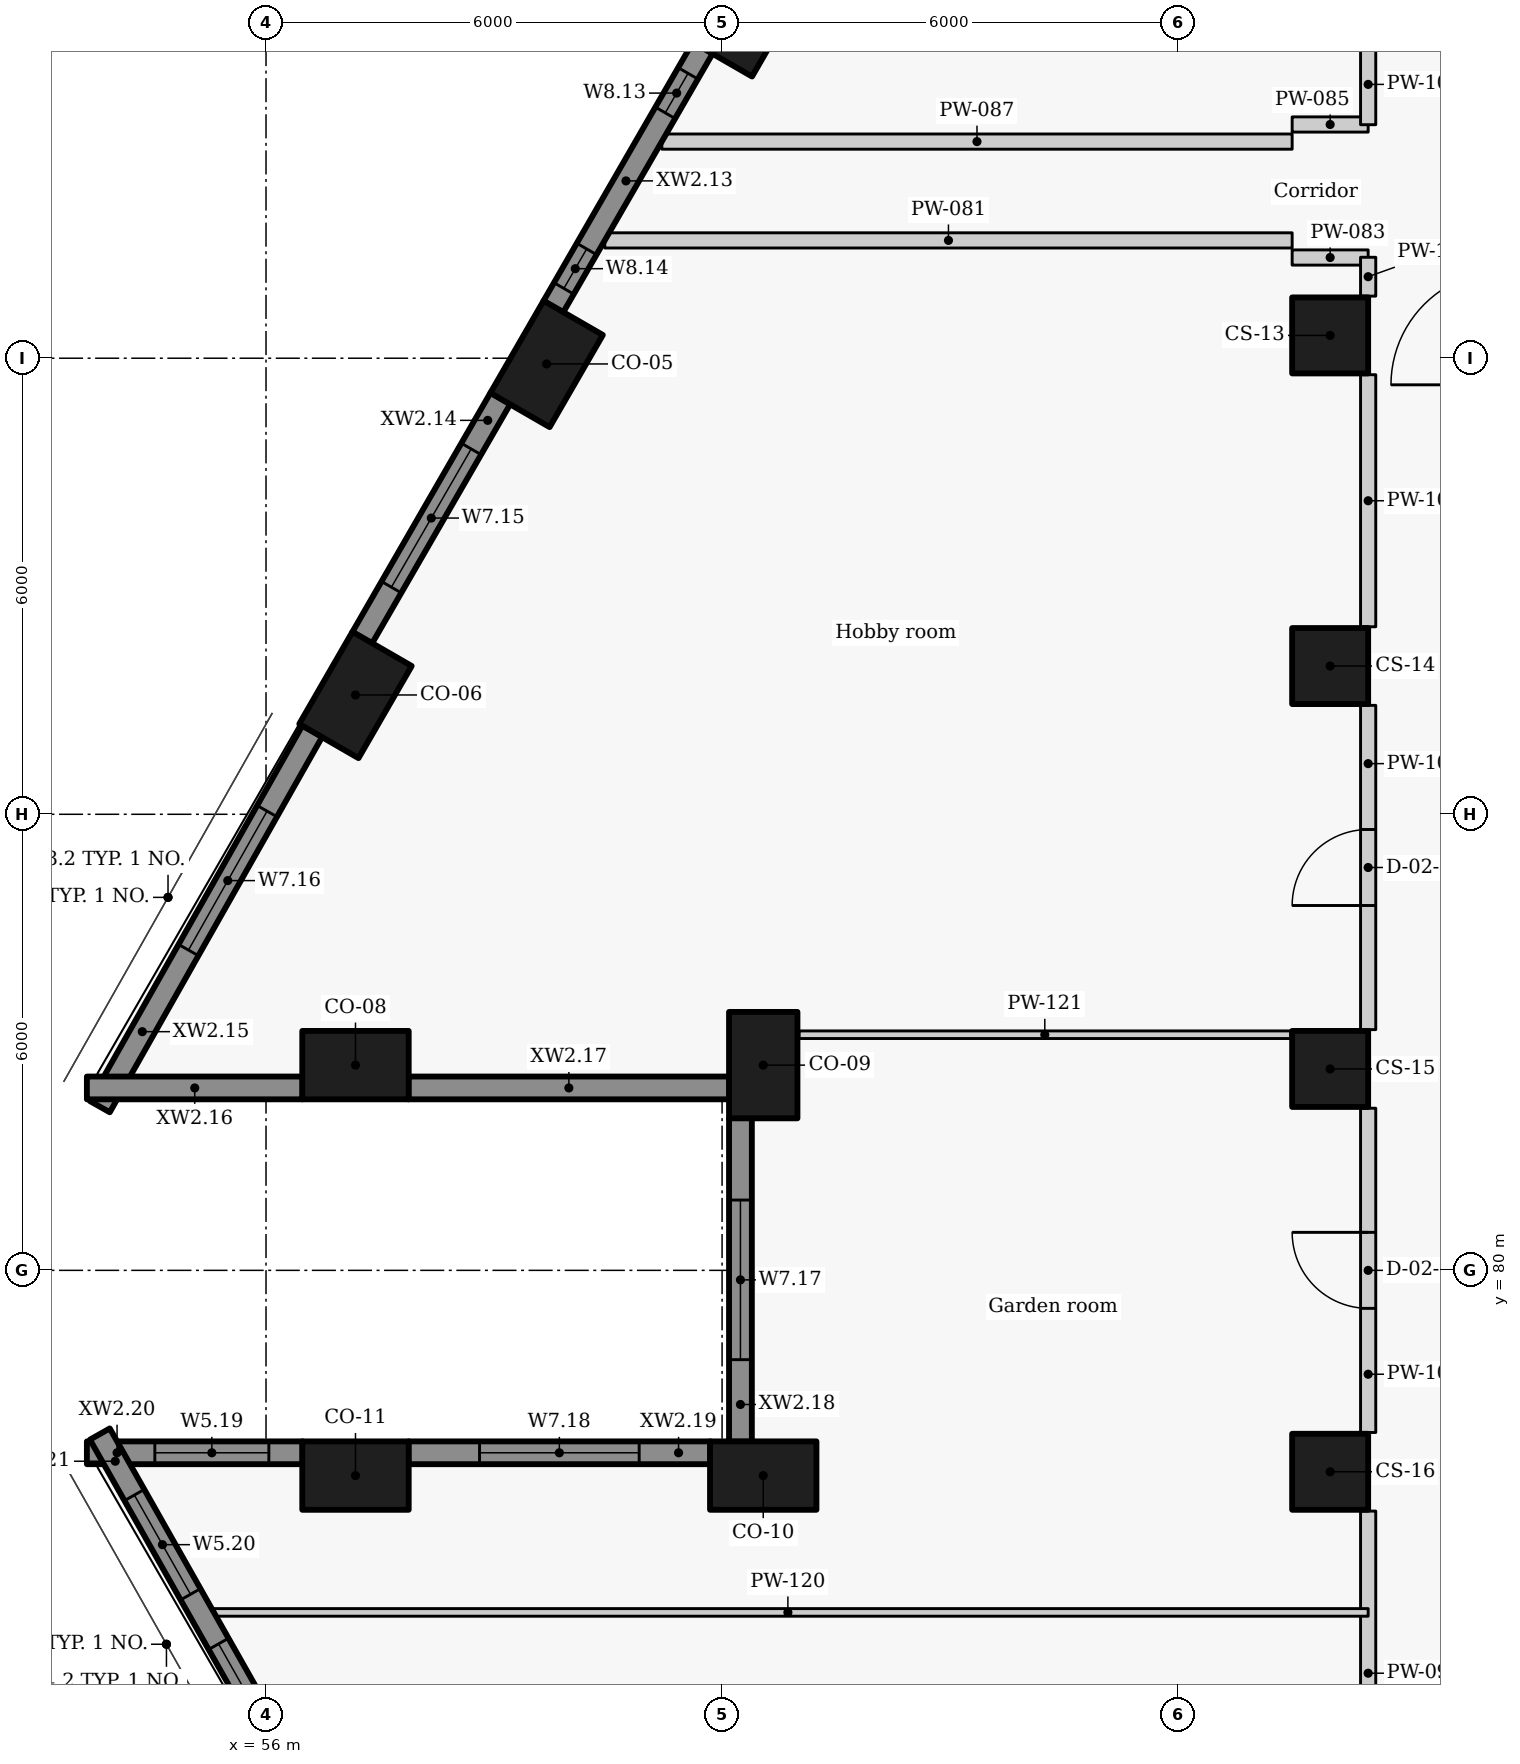
"""IFC4 building model, lengths in metres.
Left out: names, types, materials, properties, quantities, classifications, styles, units other than length and angle.
Written with IfcOpenShell. Run it as: python <this file> out.ifc"""

import sys

from ifc_helpers import new_model, si_unit, direction, frame, frame_2d, origin, origin_2d, place, context, subcontext, project, spatial, rectangle, extrude, element, fill, save


model = new_model("IFC4")
c1 = context("Model", 3, precision=1e-05, world=origin(), true_north=direction((0.0, 1.0)))
c2 = subcontext(c1, "Body", "Model", "MODEL_VIEW")
j1 = project(units=[si_unit("LENGTHUNIT", "METRE"), si_unit("PLANEANGLEUNIT", "RADIAN")], contexts=[c1])
p1 = place(None, origin())
s1 = spatial("IfcSite", under=j1, at=p1, CompositionType="ELEMENT")
p2 = place(p1, origin())
s2 = spatial("IfcBuilding", under=s1, at=p2, CompositionType="ELEMENT")
p3 = place(p2, frame((0.0, 0.0, 77.7)))
s3 = spatial("IfcBuildingStorey", under=s2, at=p3, CompositionType="ELEMENT", Elevation=77.7)
for number, where, z_axis, x_axis in (
    (1, (62.354, 96.537, 0.0), (0.0, 0.0, 1.0), (-0.5, -0.866, 0.0)),
    (2, (59.692, 91.925, 0.0), (0.0, 0.0, 1.0), (-0.5, -0.866, 0.0)),
    (3, (57.177, 87.57, 0.0), (0.0, 0.0, 1.0), (-0.5, -0.866, 0.0)),
    (4, (57.177, 82.7, 0.0), (0.0, 0.0, 1.0), (1.0, 0.0, 0.0)),
    (5, (62.542, 82.7, 0.0), (0.0, 0.0, 1.0), (0.0, -1.0, 0.0)),
    (6, (62.542, 77.3, 0.0), (0.0, 0.0, 1.0), (-1.0, 0.0, 0.0)),
    (7, (57.177, 77.3, 0.0), (0.0, 0.0, 1.0), (-1.0, 0.0, 0.0)),
):
    element("IfcColumn", number, at=place(p3, frame(where, z_axis=z_axis, x_axis=x_axis)), inside=s3, PredefinedType="COLUMN", context=c2, shape_type="SweptSolid", body=[
        extrude(rectangle(XDim=1.4, YDim=0.9, at=origin_2d()), origin(), (0.0, 0.0, 1.0), 3.3),
    ])
for number, where, z_axis, x_axis in (
    (8, (70.0, 92.3, 0.0), (0.0, 0.0, 1.0), (0.0, -1.0, 0.0)),
    (9, (70.0, 87.95, 0.0), (0.0, 0.0, 1.0), (0.0, -1.0, 0.0)),
    (10, (70.0, 82.65, 0.0), (0.0, 0.0, 1.0), (0.0, -1.0, 0.0)),
    (11, (70.0, 77.35, 0.0), (0.0, 0.0, 1.0), (0.0, -1.0, 0.0)),
):
    element("IfcColumn", number, at=place(p3, frame(where, z_axis=z_axis, x_axis=x_axis)), inside=s3, PredefinedType="COLUMN", context=c2, shape_type="SweptSolid", body=[
        extrude(rectangle(XDim=1.0, YDim=1.0, at=origin_2d()), origin(), (0.0, 0.0, 1.0), 3.3),
    ])
p4 = place(p3, frame((61.747, 96.084, 0.0), z_axis=(0.0, 0.0, 1.0), x_axis=(-0.499957037901, -0.866050206543, 0.0)))
e12 = element("IfcWall", 12, at=p4, inside=s3, PredefinedType="SOLIDWALL", context=c2, shape_type="SweptSolid", body=[
    extrude(rectangle(XDim=3.934, YDim=0.3, at=frame_2d((1.967, 0.0))), origin(), (0.0, 0.0, 1.0), 2.425),
])
p5 = place(p4, frame((0.389, 0.0, 0.9)))
e13 = element("IfcOpeningElement", 13, at=p5, cuts=e12, PredefinedType="OPENING", context=c2, shape_type="SweptSolid", body=[
    extrude(rectangle(XDim=0.6, YDim=1.1, at=frame_2d((0.3, 0.55))), frame((0.0, 0.16, 0.0), z_axis=(0.0, -1.0, 0.0), x_axis=(1.0, 0.0, 0.0)), (0.0, 0.0, 1.0), 0.32),
])
p6 = place(p4, frame((3.056, 0.0, 0.9)))
e14 = element("IfcOpeningElement", 14, at=p6, cuts=e12, PredefinedType="OPENING", context=c2, shape_type="SweptSolid", body=[
    extrude(rectangle(XDim=0.6, YDim=1.1, at=frame_2d((0.3, 0.55))), frame((0.0, 0.16, 0.0), z_axis=(0.0, -1.0, 0.0), x_axis=(1.0, 0.0, 0.0)), (0.0, 0.0, 1.0), 0.32),
])
p7 = place(p3, frame((59.084, 91.472, 0.0), z_axis=(0.0, 0.0, 1.0), x_axis=(-0.500009139881, -0.866020126807, 0.0)))
e15 = element("IfcWall", 15, at=p7, inside=s3, PredefinedType="SOLIDWALL", context=c2, shape_type="SweptSolid", body=[
    extrude(rectangle(XDim=3.637, YDim=0.3, at=frame_2d((1.818, 0.0))), origin(), (0.0, 0.0, 1.0), 2.425),
])
p8 = place(p7, frame((0.768, 0.0, 0.9)))
e16 = element("IfcOpeningElement", 16, at=p8, cuts=e15, PredefinedType="OPENING", context=c2, shape_type="SweptSolid", body=[
    extrude(rectangle(XDim=2.1, YDim=1.1, at=frame_2d((1.05, 0.55))), frame((0.0, 0.16, 0.0), z_axis=(0.0, -1.0, 0.0), x_axis=(1.0, 0.0, 0.0)), (0.0, 0.0, 1.0), 0.32),
])
p9 = place(p3, frame((56.609, 87.094, 0.0), z_axis=(0.0, 0.0, 1.0), x_axis=(-0.492456858874, -0.870336855561, 0.0)))
e17 = element("IfcWall", 17, at=p9, inside=s3, PredefinedType="SOLIDWALL", context=c2, shape_type="SweptSolid", body=[
    extrude(rectangle(XDim=5.677, YDim=0.3, at=frame_2d((2.838, 0.0))), origin(), (0.0, 0.0, 1.0), 2.425),
])
p10 = place(p9, frame((1.209, 0.0, 0.9)))
e18 = element("IfcOpeningElement", 18, at=p10, cuts=e17, PredefinedType="OPENING", context=c2, shape_type="SweptSolid", body=[
    extrude(rectangle(XDim=2.1, YDim=1.1, at=frame_2d((1.05, 0.55))), frame((0.0, 0.16, 0.0), z_axis=(0.0, -1.0, 0.0), x_axis=(1.0, 0.0, 0.0)), (0.0, 0.0, 1.0), 0.32),
])
p11 = place(p3, frame((53.643, 82.4, 0.0), z_axis=(0.0, 0.0, 1.0), x_axis=(1.0, 0.0, 0.0)))
e19 = element("IfcWall", 19, at=p11, inside=s3, PredefinedType="SOLIDWALL", context=c2, shape_type="SweptSolid", body=[
    extrude(rectangle(XDim=2.838, YDim=0.3, at=frame_2d((1.419, 0.0))), origin(), (0.0, 0.0, 1.0), 2.425),
])
p12 = place(p3, frame((57.873, 82.4, 0.0), z_axis=(0.0, 0.0, 1.0), x_axis=(1.0, 0.0, 0.0)))
e20 = element("IfcWall", 20, at=p12, inside=s3, PredefinedType="SOLIDWALL", context=c2, shape_type="SweptSolid", body=[
    extrude(rectangle(XDim=4.223, YDim=0.3, at=frame_2d((2.111, 0.0))), origin(), (0.0, 0.0, 1.0), 2.425),
])
p13 = place(p3, frame((62.242, 82.004, 0.0), z_axis=(0.0, 0.0, 1.0), x_axis=(0.0, -1.0, 0.0)))
e21 = element("IfcWall", 21, at=p13, inside=s3, PredefinedType="SOLIDWALL", context=c2, shape_type="SweptSolid", body=[
    extrude(rectangle(XDim=4.258, YDim=0.3, at=frame_2d((2.129, 0.0))), origin(), (0.0, 0.0, 1.0), 2.425),
])
p14 = place(p13, frame((1.079, 0.0, 0.9)))
e22 = element("IfcOpeningElement", 22, at=p14, cuts=e21, PredefinedType="OPENING", context=c2, shape_type="SweptSolid", body=[
    extrude(rectangle(XDim=2.1, YDim=1.1, at=frame_2d((1.05, 0.55))), frame((0.0, 0.16, 0.0), z_axis=(0.0, -1.0, 0.0), x_axis=(1.0, 0.0, 0.0)), (0.0, 0.0, 1.0), 0.32),
])
p15 = place(p3, frame((61.846, 77.6, 0.0), z_axis=(0.0, 0.0, 1.0), x_axis=(-1.0, 0.0, 0.0)))
e23 = element("IfcWall", 23, at=p15, inside=s3, PredefinedType="SOLIDWALL", context=c2, shape_type="SweptSolid", body=[
    extrude(rectangle(XDim=3.973, YDim=0.3, at=frame_2d((1.986, 0.0))), origin(), (0.0, 0.0, 1.0), 2.425),
])
p16 = place(p15, frame((0.936, 0.0, 0.9)))
e24 = element("IfcOpeningElement", 24, at=p16, cuts=e23, PredefinedType="OPENING", context=c2, shape_type="SweptSolid", body=[
    extrude(rectangle(XDim=2.1, YDim=1.1, at=frame_2d((1.05, 0.55))), frame((0.0, 0.16, 0.0), z_axis=(0.0, -1.0, 0.0), x_axis=(1.0, 0.0, 0.0)), (0.0, 0.0, 1.0), 0.32),
])
p17 = place(p3, frame((56.481, 77.6, 0.0), z_axis=(0.0, 0.0, 1.0), x_axis=(-1.0, 0.0, 0.0)))
e25 = element("IfcWall", 25, at=p17, inside=s3, PredefinedType="SOLIDWALL", context=c2, shape_type="SweptSolid", body=[
    extrude(rectangle(XDim=2.838, YDim=0.3, at=frame_2d((1.419, 0.0))), origin(), (0.0, 0.0, 1.0), 2.425),
])
p18 = place(p17, frame((0.444, 0.0, 0.9)))
e26 = element("IfcOpeningElement", 26, at=p18, cuts=e25, PredefinedType="OPENING", context=c2, shape_type="SweptSolid", body=[
    extrude(rectangle(XDim=1.5, YDim=1.1, at=frame_2d((0.75, 0.55))), frame((0.0, 0.16, 0.0), z_axis=(0.0, -1.0, 0.0), x_axis=(1.0, 0.0, 0.0)), (0.0, 0.0, 1.0), 0.32),
])
p19 = place(p3, frame((53.814, 77.847, 0.0), z_axis=(0.0, 0.0, 1.0), x_axis=(0.492456858874, -0.870336855561, 0.0)))
e27 = element("IfcWall", 27, at=p19, inside=s3, PredefinedType="SOLIDWALL", context=c2, shape_type="SweptSolid", body=[
    extrude(rectangle(XDim=5.677, YDim=0.3, at=frame_2d((2.838, 0.0))), origin(), (0.0, 0.0, 1.0), 2.425),
])
p20 = place(p19, frame((0.922, 0.0, 0.9)))
e28 = element("IfcOpeningElement", 28, at=p20, cuts=e27, PredefinedType="OPENING", context=c2, shape_type="SweptSolid", body=[
    extrude(rectangle(XDim=1.5, YDim=1.1, at=frame_2d((0.75, 0.55))), frame((0.0, 0.16, 0.0), z_axis=(0.0, -1.0, 0.0), x_axis=(1.0, 0.0, 0.0)), (0.0, 0.0, 1.0), 0.32),
])
p21 = place(p19, frame((3.172, 0.0, 0.9)))
e29 = element("IfcOpeningElement", 29, at=p21, cuts=e27, PredefinedType="OPENING", context=c2, shape_type="SweptSolid", body=[
    extrude(rectangle(XDim=2.1, YDim=1.1, at=frame_2d((1.05, 0.55))), frame((0.0, 0.16, 0.0), z_axis=(0.0, -1.0, 0.0), x_axis=(1.0, 0.0, 0.0)), (0.0, 0.0, 1.0), 0.32),
])
p22 = place(p3, frame((60.457, 93.55, 0.0), z_axis=(0.0, 0.0, 1.0), x_axis=(1.0, 0.0, 0.0)))
e30 = element("IfcWall", 30, at=p22, inside=s3, PredefinedType="PARTITIONING", context=c2, shape_type="SweptSolid", body=[
    extrude(rectangle(XDim=9.043, YDim=0.2, at=frame_2d((4.521, 0.0))), origin(), (0.0, 0.0, 1.0), 2.405),
])
for number, where, z_axis, x_axis in (
    (31, (69.5, 93.325, 0.0), (0.0, 0.0, 1.0), (1.0, 0.0, 0.0)),
    (32, (69.5, 95.075, 0.0), (0.0, 0.0, 1.0), (1.0, 0.0, 0.0)),
):
    element("IfcWall", number, at=place(p3, frame(where, z_axis=z_axis, x_axis=x_axis)), inside=s3, PredefinedType="PARTITIONING", context=c2, shape_type="SweptSolid", body=[
        extrude(rectangle(XDim=1.0, YDim=0.2, at=frame_2d((0.5, 0.0))), origin(), (0.0, 0.0, 1.0), 2.505),
    ])
p23 = place(p3, frame((61.207, 94.85, 0.0), z_axis=(0.0, 0.0, 1.0), x_axis=(1.0, 0.0, 0.0)))
e33 = element("IfcWall", 33, at=p23, inside=s3, PredefinedType="PARTITIONING", context=c2, shape_type="SweptSolid", body=[
    extrude(rectangle(XDim=8.293, YDim=0.2, at=frame_2d((4.146, 0.0))), origin(), (0.0, 0.0, 1.0), 2.405),
])
p24 = place(p3, frame((70.5, 72.567, 0.0), z_axis=(0.0, 0.0, 1.0), x_axis=(0.0, 1.0, 0.0)))
e34 = element("IfcWall", 34, at=p24, inside=s3, PredefinedType="PARTITIONING", context=c2, shape_type="SweptSolid", body=[
    extrude(rectangle(XDim=4.266, YDim=0.2, at=frame_2d((2.133, 0.0))), origin(), (0.0, 0.0, 1.0), 3.025),
])
p25 = place(p3, frame((70.5, 77.867, 0.0), z_axis=(0.0, 0.0, 1.0), x_axis=(0.0, 1.0, 0.0)))
e35 = element("IfcWall", 35, at=p25, inside=s3, PredefinedType="PARTITIONING", context=c2, shape_type="SweptSolid", body=[
    extrude(rectangle(XDim=4.266, YDim=0.2, at=frame_2d((2.133, 0.0))), origin(), (0.0, 0.0, 1.0), 3.025),
])
p26 = place(p25, frame((1.633, 0.0, 0.0)))
e36 = element("IfcOpeningElement", 36, at=p26, cuts=e35, PredefinedType="OPENING", context=c2, shape_type="SweptSolid", body=[
    extrude(rectangle(XDim=1.0, YDim=2.1, at=frame_2d((0.5, 1.05))), frame((0.0, 0.11, 0.0), z_axis=(0.0, -1.0, 0.0), x_axis=(1.0, 0.0, 0.0)), (0.0, 0.0, 1.0), 0.22),
])
p27 = place(p3, frame((70.5, 83.167, 0.0), z_axis=(0.0, 0.0, 1.0), x_axis=(0.0, 1.0, 0.0)))
e37 = element("IfcWall", 37, at=p27, inside=s3, PredefinedType="PARTITIONING", context=c2, shape_type="SweptSolid", body=[
    extrude(rectangle(XDim=4.266, YDim=0.2, at=frame_2d((2.133, 0.0))), origin(), (0.0, 0.0, 1.0), 3.025),
])
p28 = place(p27, frame((1.633, 0.0, 0.0)))
e38 = element("IfcOpeningElement", 38, at=p28, cuts=e37, PredefinedType="OPENING", context=c2, shape_type="SweptSolid", body=[
    extrude(rectangle(XDim=1.0, YDim=2.1, at=frame_2d((0.5, 1.05))), frame((0.0, 0.11, 0.0), z_axis=(0.0, -1.0, 0.0), x_axis=(1.0, 0.0, 0.0)), (0.0, 0.0, 1.0), 0.22),
])
p29 = place(p3, frame((70.5, 88.467, 0.0), z_axis=(0.0, 0.0, 1.0), x_axis=(0.0, 1.0, 0.0)))
e39 = element("IfcWall", 39, at=p29, inside=s3, PredefinedType="PARTITIONING", context=c2, shape_type="SweptSolid", body=[
    extrude(rectangle(XDim=3.316, YDim=0.2, at=frame_2d((1.658, 0.0))), origin(), (0.0, 0.0, 1.0), 3.025),
])
p30 = place(p3, frame((70.5, 92.817, 0.0), z_axis=(0.0, 0.0, 1.0), x_axis=(0.0, 1.0, 0.0)))
e40 = element("IfcWall", 40, at=p30, inside=s3, PredefinedType="PARTITIONING", context=c2, shape_type="SweptSolid", body=[
    extrude(rectangle(XDim=0.511, YDim=0.2, at=frame_2d((0.255, 0.0))), origin(), (0.0, 0.0, 1.0), 3.025),
])
p31 = place(p3, frame((70.5, 95.072, 0.0), z_axis=(0.0, 0.0, 1.0), x_axis=(0.0, 1.0, 0.0)))
e41 = element("IfcWall", 41, at=p31, inside=s3, PredefinedType="PARTITIONING", context=c2, shape_type="SweptSolid", body=[
    extrude(rectangle(XDim=1.061, YDim=0.2, at=frame_2d((0.531, 0.0))), origin(), (0.0, 0.0, 1.0), 3.025),
])
p32 = place(p3, frame((55.232, 75.5, 0.0), z_axis=(0.0, 0.0, 1.0), x_axis=(1.0, 0.0, 0.0)))
e42 = element("IfcWall", 42, at=p32, inside=s3, PredefinedType="PARTITIONING", context=c2, shape_type="SweptSolid", body=[
    extrude(rectangle(XDim=15.268, YDim=0.1, at=frame_2d((7.634, 0.0))), origin(), (0.0, 0.0, 1.0), 2.405),
])
p33 = place(p3, frame((63.012, 83.1, 0.0), z_axis=(0.0, 0.0, 1.0), x_axis=(1.0, 0.0, 0.0)))
e43 = element("IfcWall", 43, at=p33, inside=s3, PredefinedType="PARTITIONING", context=c2, shape_type="SweptSolid", body=[
    extrude(rectangle(XDim=6.468, YDim=0.1, at=frame_2d((3.234, 0.0))), origin(), (0.0, 0.0, 1.0), 3.025),
])
p34 = place(p5, origin())
e44 = element("IfcWindow", 44, at=p34, inside=s3, PartitioningType="SINGLE_PANEL", PredefinedType="WINDOW", context=c2, shape_type="SweptSolid", body=[
    extrude(rectangle(XDim=0.6, YDim=1.1, at=frame_2d((0.3, 0.55))), frame((0.0, 0.03, 0.0), z_axis=(0.0, -1.0, 0.0), x_axis=(1.0, 0.0, 0.0)), (0.0, 0.0, 1.0), 0.06),
])
fill(e13, e44)
p35 = place(p6, origin())
e45 = element("IfcWindow", 45, at=p35, inside=s3, PartitioningType="SINGLE_PANEL", PredefinedType="WINDOW", context=c2, shape_type="SweptSolid", body=[
    extrude(rectangle(XDim=0.6, YDim=1.1, at=frame_2d((0.3, 0.55))), frame((0.0, 0.03, 0.0), z_axis=(0.0, -1.0, 0.0), x_axis=(1.0, 0.0, 0.0)), (0.0, 0.0, 1.0), 0.06),
])
fill(e14, e45)
p36 = place(p8, origin())
e46 = element("IfcWindow", 46, at=p36, inside=s3, PartitioningType="SINGLE_PANEL", PredefinedType="WINDOW", context=c2, shape_type="SweptSolid", body=[
    extrude(rectangle(XDim=2.1, YDim=1.1, at=frame_2d((1.05, 0.55))), frame((0.0, 0.03, 0.0), z_axis=(0.0, -1.0, 0.0), x_axis=(1.0, 0.0, 0.0)), (0.0, 0.0, 1.0), 0.06),
])
fill(e16, e46)
p37 = place(p10, origin())
e47 = element("IfcWindow", 47, at=p37, inside=s3, PartitioningType="SINGLE_PANEL", PredefinedType="WINDOW", context=c2, shape_type="SweptSolid", body=[
    extrude(rectangle(XDim=2.1, YDim=1.1, at=frame_2d((1.05, 0.55))), frame((0.0, 0.03, 0.0), z_axis=(0.0, -1.0, 0.0), x_axis=(1.0, 0.0, 0.0)), (0.0, 0.0, 1.0), 0.06),
])
fill(e18, e47)
p38 = place(p14, origin())
e48 = element("IfcWindow", 48, at=p38, inside=s3, PartitioningType="SINGLE_PANEL", PredefinedType="WINDOW", context=c2, shape_type="SweptSolid", body=[
    extrude(rectangle(XDim=2.1, YDim=1.1, at=frame_2d((1.05, 0.55))), frame((0.0, 0.03, 0.0), z_axis=(0.0, -1.0, 0.0), x_axis=(1.0, 0.0, 0.0)), (0.0, 0.0, 1.0), 0.06),
])
fill(e22, e48)
p39 = place(p16, origin())
e49 = element("IfcWindow", 49, at=p39, inside=s3, PartitioningType="SINGLE_PANEL", PredefinedType="WINDOW", context=c2, shape_type="SweptSolid", body=[
    extrude(rectangle(XDim=2.1, YDim=1.1, at=frame_2d((1.05, 0.55))), frame((0.0, 0.03, 0.0), z_axis=(0.0, -1.0, 0.0), x_axis=(1.0, 0.0, 0.0)), (0.0, 0.0, 1.0), 0.06),
])
fill(e24, e49)
p40 = place(p18, origin())
e50 = element("IfcWindow", 50, at=p40, inside=s3, PartitioningType="SINGLE_PANEL", PredefinedType="WINDOW", context=c2, shape_type="SweptSolid", body=[
    extrude(rectangle(XDim=1.5, YDim=1.1, at=frame_2d((0.75, 0.55))), frame((0.0, 0.03, 0.0), z_axis=(0.0, -1.0, 0.0), x_axis=(1.0, 0.0, 0.0)), (0.0, 0.0, 1.0), 0.06),
])
fill(e26, e50)
p41 = place(p20, origin())
e51 = element("IfcWindow", 51, at=p41, inside=s3, PartitioningType="SINGLE_PANEL", PredefinedType="WINDOW", context=c2, shape_type="SweptSolid", body=[
    extrude(rectangle(XDim=1.5, YDim=1.1, at=frame_2d((0.75, 0.55))), frame((0.0, 0.03, 0.0), z_axis=(0.0, -1.0, 0.0), x_axis=(1.0, 0.0, 0.0)), (0.0, 0.0, 1.0), 0.06),
])
fill(e28, e51)
p42 = place(p21, origin())
e52 = element("IfcWindow", 52, at=p42, inside=s3, PartitioningType="SINGLE_PANEL", PredefinedType="WINDOW", context=c2, shape_type="SweptSolid", body=[
    extrude(rectangle(XDim=2.1, YDim=1.1, at=frame_2d((1.05, 0.55))), frame((0.0, 0.03, 0.0), z_axis=(0.0, -1.0, 0.0), x_axis=(1.0, 0.0, 0.0)), (0.0, 0.0, 1.0), 0.06),
])
fill(e29, e52)
p43 = place(p26, origin())
e53 = element("IfcDoor", 53, at=p43, inside=s3, OperationType="SINGLE_SWING_RIGHT", PredefinedType="DOOR", context=c2, shape_type="SweptSolid", body=[
    extrude(rectangle(XDim=1.0, YDim=2.1, at=frame_2d((0.5, 1.05))), frame((0.0, 0.025, 0.0), z_axis=(0.0, -1.0, 0.0), x_axis=(1.0, 0.0, 0.0)), (0.0, 0.0, 1.0), 0.05),
])
fill(e36, e53)
p44 = place(p28, origin())
e54 = element("IfcDoor", 54, at=p44, inside=s3, OperationType="SINGLE_SWING_LEFT", PredefinedType="DOOR", context=c2, shape_type="SweptSolid", body=[
    extrude(rectangle(XDim=1.0, YDim=2.1, at=frame_2d((0.5, 1.05))), frame((0.0, 0.025, 0.0), z_axis=(0.0, -1.0, 0.0), x_axis=(1.0, 0.0, 0.0)), (0.0, 0.0, 1.0), 0.05),
])
fill(e38, e54)
save(model, sys.argv[1])
